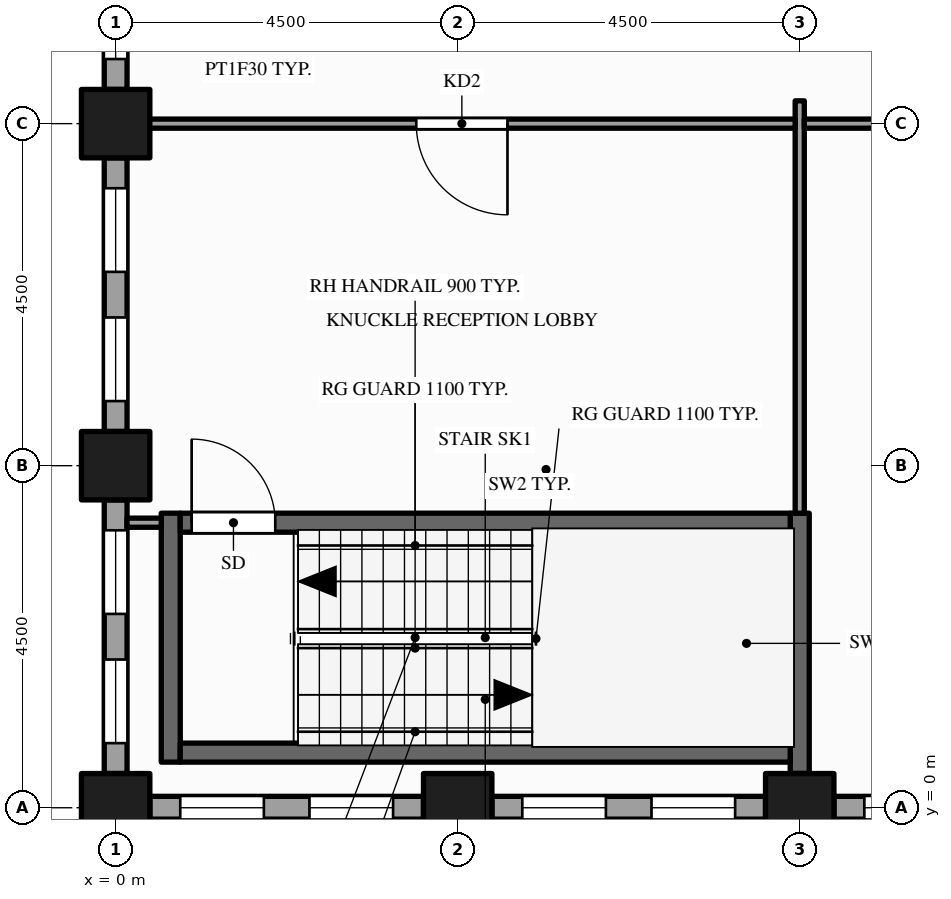
"""IFC4 building model, lengths in metres.
Left out: names, types, materials, properties, quantities, classifications, styles, units other than length and angle.
Written with IfcOpenShell. Run it as: python <this file> out.ifc"""

import sys

from ifc_helpers import new_model, si_unit, direction, frame, frame_2d, origin, origin_2d, place, context, subcontext, project, spatial, rectangle, hollow_rectangle, extrude, element, fill, save


model = new_model("IFC4")
c1 = context("Model", 3, precision=1e-05, world=origin(), true_north=direction((0.0, 1.0)))
c2 = subcontext(c1, "Body", "Model", "MODEL_VIEW")
j1 = project(units=[si_unit("LENGTHUNIT", "METRE"), si_unit("PLANEANGLEUNIT", "RADIAN")], contexts=[c1])
p1 = place(None, origin())
s1 = spatial("IfcSite", under=j1, at=p1, CompositionType="ELEMENT")
p2 = place(p1, origin())
s2 = spatial("IfcBuilding", under=s1, at=p2, CompositionType="ELEMENT")
p3 = place(p2, frame((0.0, 0.0, 139.0)))
s3 = spatial("IfcBuildingStorey", under=s2, at=p3, CompositionType="ELEMENT", Elevation=139.0)
for number, where, z_axis, x_axis in (
    (1, (0.0, 0.0, -0.15), (0.0, 0.0, 1.0), (1.0, 0.0, 0.0)),
    (2, (0.0, 4.5, -0.15), (0.0, 0.0, 1.0), (1.0, 0.0, 0.0)),
    (3, (0.0, 9.0, -0.15), (0.0, 0.0, 1.0), (1.0, 0.0, 0.0)),
    (4, (4.5, 0.0, -0.15), (0.0, 0.0, 1.0), (1.0, 0.0, 0.0)),
    (5, (9.0, 0.0, -0.15), (0.0, 0.0, 1.0), (1.0, 0.0, 0.0)),
):
    element("IfcColumn", number, at=place(p3, frame(where, z_axis=z_axis, x_axis=x_axis)), inside=s3, PredefinedType="COLUMN", context=c2, shape_type="SweptSolid", body=[
        extrude(hollow_rectangle(XDim=0.9, YDim=0.9, WallThickness=0.045, at=origin_2d()), origin(), (0.0, 0.0, 1.0), 4.0),
    ])
p4 = place(p3, frame((0.0, 13.05, 0.0), z_axis=(0.0, 0.0, 1.0), x_axis=(0.0, -1.0, 0.0)))
e6 = element("IfcWall", 6, at=p4, inside=s3, PredefinedType="STANDARD", context=c2, shape_type="SweptSolid", body=[
    extrude(rectangle(XDim=3.6, YDim=0.3, at=frame_2d((1.8, 0.0))), origin(), (0.0, 0.0, 1.0), 3.149),
])
p5 = place(p4, frame((0.4, 0.0, 0.9)))
e7 = element("IfcOpeningElement", 7, at=p5, cuts=e6, PredefinedType="OPENING", context=c2, shape_type="SweptSolid", body=[
    extrude(rectangle(XDim=1.1, YDim=2.0, at=frame_2d((0.55, 1.0))), frame((0.0, 0.16, 0.0), z_axis=(0.0, -1.0, 0.0), x_axis=(1.0, 0.0, 0.0)), (0.0, 0.0, 1.0), 0.32),
])
p6 = place(p4, frame((2.1, 0.0, 0.9)))
e8 = element("IfcOpeningElement", 8, at=p6, cuts=e6, PredefinedType="OPENING", context=c2, shape_type="SweptSolid", body=[
    extrude(rectangle(XDim=1.1, YDim=2.0, at=frame_2d((0.55, 1.0))), frame((0.0, 0.16, 0.0), z_axis=(0.0, -1.0, 0.0), x_axis=(1.0, 0.0, 0.0)), (0.0, 0.0, 1.0), 0.32),
])
p7 = place(p3, frame((0.0, 8.55, 0.0), z_axis=(0.0, 0.0, 1.0), x_axis=(0.0, -1.0, 0.0)))
e9 = element("IfcWall", 9, at=p7, inside=s3, PredefinedType="STANDARD", context=c2, shape_type="SweptSolid", body=[
    extrude(rectangle(XDim=3.6, YDim=0.3, at=frame_2d((1.8, 0.0))), origin(), (0.0, 0.0, 1.0), 3.149),
])
p8 = place(p7, frame((0.4, 0.0, 0.9)))
e10 = element("IfcOpeningElement", 10, at=p8, cuts=e9, PredefinedType="OPENING", context=c2, shape_type="SweptSolid", body=[
    extrude(rectangle(XDim=1.1, YDim=2.0, at=frame_2d((0.55, 1.0))), frame((0.0, 0.16, 0.0), z_axis=(0.0, -1.0, 0.0), x_axis=(1.0, 0.0, 0.0)), (0.0, 0.0, 1.0), 0.32),
])
p9 = place(p7, frame((2.1, 0.0, 0.9)))
e11 = element("IfcOpeningElement", 11, at=p9, cuts=e9, PredefinedType="OPENING", context=c2, shape_type="SweptSolid", body=[
    extrude(rectangle(XDim=1.1, YDim=2.0, at=frame_2d((0.55, 1.0))), frame((0.0, 0.16, 0.0), z_axis=(0.0, -1.0, 0.0), x_axis=(1.0, 0.0, 0.0)), (0.0, 0.0, 1.0), 0.32),
])
p10 = place(p3, frame((0.0, 4.05, 0.0), z_axis=(0.0, 0.0, 1.0), x_axis=(0.0, -1.0, 0.0)))
e12 = element("IfcWall", 12, at=p10, inside=s3, PredefinedType="STANDARD", context=c2, shape_type="SweptSolid", body=[
    extrude(rectangle(XDim=3.6, YDim=0.3, at=frame_2d((1.8, 0.0))), origin(), (0.0, 0.0, 1.0), 3.149),
])
p11 = place(p10, frame((0.4, 0.0, 0.9)))
e13 = element("IfcOpeningElement", 13, at=p11, cuts=e12, PredefinedType="OPENING", context=c2, shape_type="SweptSolid", body=[
    extrude(rectangle(XDim=1.1, YDim=2.0, at=frame_2d((0.55, 1.0))), frame((0.0, 0.16, 0.0), z_axis=(0.0, -1.0, 0.0), x_axis=(1.0, 0.0, 0.0)), (0.0, 0.0, 1.0), 0.32),
])
p12 = place(p10, frame((2.1, 0.0, 0.9)))
e14 = element("IfcOpeningElement", 14, at=p12, cuts=e12, PredefinedType="OPENING", context=c2, shape_type="SweptSolid", body=[
    extrude(rectangle(XDim=1.1, YDim=2.0, at=frame_2d((0.55, 1.0))), frame((0.0, 0.16, 0.0), z_axis=(0.0, -1.0, 0.0), x_axis=(1.0, 0.0, 0.0)), (0.0, 0.0, 1.0), 0.32),
])
p13 = place(p3, frame((0.45, 0.0, 0.0), z_axis=(0.0, 0.0, 1.0), x_axis=(1.0, 0.0, 0.0)))
e15 = element("IfcWall", 15, at=p13, inside=s3, PredefinedType="STANDARD", context=c2, shape_type="SweptSolid", body=[
    extrude(rectangle(XDim=3.6, YDim=0.3, at=frame_2d((1.8, 0.0))), origin(), (0.0, 0.0, 1.0), 3.149),
])
p14 = place(p13, frame((0.4, 0.0, 0.9)))
e16 = element("IfcOpeningElement", 16, at=p14, cuts=e15, PredefinedType="OPENING", context=c2, shape_type="SweptSolid", body=[
    extrude(rectangle(XDim=1.1, YDim=2.0, at=frame_2d((0.55, 1.0))), frame((0.0, 0.16, 0.0), z_axis=(0.0, -1.0, 0.0), x_axis=(1.0, 0.0, 0.0)), (0.0, 0.0, 1.0), 0.32),
])
p15 = place(p13, frame((2.1, 0.0, 0.9)))
e17 = element("IfcOpeningElement", 17, at=p15, cuts=e15, PredefinedType="OPENING", context=c2, shape_type="SweptSolid", body=[
    extrude(rectangle(XDim=1.1, YDim=2.0, at=frame_2d((0.55, 1.0))), frame((0.0, 0.16, 0.0), z_axis=(0.0, -1.0, 0.0), x_axis=(1.0, 0.0, 0.0)), (0.0, 0.0, 1.0), 0.32),
])
p16 = place(p3, frame((4.95, 0.0, 0.0), z_axis=(0.0, 0.0, 1.0), x_axis=(1.0, 0.0, 0.0)))
e18 = element("IfcWall", 18, at=p16, inside=s3, PredefinedType="STANDARD", context=c2, shape_type="SweptSolid", body=[
    extrude(rectangle(XDim=3.6, YDim=0.3, at=frame_2d((1.8, 0.0))), origin(), (0.0, 0.0, 1.0), 3.149),
])
p17 = place(p16, frame((0.4, 0.0, 0.9)))
e19 = element("IfcOpeningElement", 19, at=p17, cuts=e18, PredefinedType="OPENING", context=c2, shape_type="SweptSolid", body=[
    extrude(rectangle(XDim=1.1, YDim=2.0, at=frame_2d((0.55, 1.0))), frame((0.0, 0.16, 0.0), z_axis=(0.0, -1.0, 0.0), x_axis=(1.0, 0.0, 0.0)), (0.0, 0.0, 1.0), 0.32),
])
p18 = place(p16, frame((2.1, 0.0, 0.9)))
e20 = element("IfcOpeningElement", 20, at=p18, cuts=e18, PredefinedType="OPENING", context=c2, shape_type="SweptSolid", body=[
    extrude(rectangle(XDim=1.1, YDim=2.0, at=frame_2d((0.55, 1.0))), frame((0.0, 0.16, 0.0), z_axis=(0.0, -1.0, 0.0), x_axis=(1.0, 0.0, 0.0)), (0.0, 0.0, 1.0), 0.32),
])
p19 = place(p3, frame((9.45, 0.0, 0.0), z_axis=(0.0, 0.0, 1.0), x_axis=(1.0, 0.0, 0.0)))
e21 = element("IfcWall", 21, at=p19, inside=s3, PredefinedType="STANDARD", context=c2, shape_type="SweptSolid", body=[
    extrude(rectangle(XDim=3.6, YDim=0.3, at=frame_2d((1.8, 0.0))), origin(), (0.0, 0.0, 1.0), 2.87),
])
p20 = place(p19, frame((0.4, 0.0, 0.9)))
e22 = element("IfcOpeningElement", 22, at=p20, cuts=e21, PredefinedType="OPENING", context=c2, shape_type="SweptSolid", body=[
    extrude(rectangle(XDim=1.1, YDim=1.75, at=frame_2d((0.55, 0.875))), frame((0.0, 0.16, 0.0), z_axis=(0.0, -1.0, 0.0), x_axis=(1.0, 0.0, 0.0)), (0.0, 0.0, 1.0), 0.32),
])
p21 = place(p19, frame((2.1, 0.0, 0.9)))
e23 = element("IfcOpeningElement", 23, at=p21, cuts=e21, PredefinedType="OPENING", context=c2, shape_type="SweptSolid", body=[
    extrude(rectangle(XDim=1.1, YDim=1.75, at=frame_2d((0.55, 0.875))), frame((0.0, 0.16, 0.0), z_axis=(0.0, -1.0, 0.0), x_axis=(1.0, 0.0, 0.0)), (0.0, 0.0, 1.0), 0.32),
])
p22 = place(p3, frame((0.725, 0.6, 0.0), z_axis=(0.0, 0.0, 1.0), x_axis=(0.0, 1.0, 0.0)))
e24 = element("IfcWall", 24, at=p22, inside=s3, PredefinedType="SHEAR", context=c2, shape_type="SweptSolid", body=[
    extrude(rectangle(XDim=3.275, YDim=0.25, at=frame_2d((1.637, 0.0))), origin(), (0.0, 0.0, 1.0), 3.85),
])
p23 = place(p3, frame((9.0, 0.15, 0.0), z_axis=(0.0, 0.0, 1.0), x_axis=(0.0, 1.0, 0.0)))
e25 = element("IfcWall", 25, at=p23, inside=s3, PredefinedType="PARTITIONING", context=c2, shape_type="SweptSolid", body=[
    extrude(rectangle(XDim=0.3, YDim=0.12, at=frame_2d((0.15, 0.0))), origin(), (0.0, 0.0, 1.0), 3.85),
])
p24 = place(p3, frame((9.0, 0.45, 0.0), z_axis=(0.0, 0.0, 1.0), x_axis=(0.0, 1.0, 0.0)))
e26 = element("IfcWall", 26, at=p24, inside=s3, PredefinedType="SHEAR", context=c2, shape_type="SweptSolid", body=[
    extrude(rectangle(XDim=3.425, YDim=0.25, at=frame_2d((1.712, 0.0))), origin(), (0.0, 0.0, 1.0), 3.85),
])
p25 = place(p3, frame((9.0, 3.875, 0.0), z_axis=(0.0, 0.0, 1.0), x_axis=(0.0, 1.0, 0.0)))
e27 = element("IfcWall", 27, at=p25, inside=s3, PredefinedType="PARTITIONING", context=c2, shape_type="SweptSolid", body=[
    extrude(rectangle(XDim=5.425, YDim=0.12, at=frame_2d((2.712, 0.0))), origin(), (0.0, 0.0, 1.0), 2.87),
])
p26 = place(p3, frame((0.85, 0.725, 0.0), z_axis=(0.0, 0.0, 1.0), x_axis=(1.0, 0.0, 0.0)))
e28 = element("IfcWall", 28, at=p26, inside=s3, PredefinedType="SHEAR", context=c2, shape_type="SweptSolid", body=[
    extrude(rectangle(XDim=8.025, YDim=0.25, at=frame_2d((4.012, 0.0))), origin(), (0.0, 0.0, 1.0), 3.85),
])
p27 = place(p3, frame((0.15, 3.75, 0.0), z_axis=(0.0, 0.0, 1.0), x_axis=(1.0, 0.0, 0.0)))
e29 = element("IfcWall", 29, at=p27, inside=s3, PredefinedType="PARTITIONING", context=c2, shape_type="SweptSolid", body=[
    extrude(rectangle(XDim=0.45, YDim=0.12, at=frame_2d((0.225, 0.0))), origin(), (0.0, 0.0, 1.0), 3.85),
])
p28 = place(p3, frame((0.85, 3.75, 0.0), z_axis=(0.0, 0.0, 1.0), x_axis=(1.0, 0.0, 0.0)))
e30 = element("IfcWall", 30, at=p28, inside=s3, PredefinedType="SHEAR", context=c2, shape_type="SweptSolid", body=[
    extrude(rectangle(XDim=8.025, YDim=0.25, at=frame_2d((4.012, 0.0))), origin(), (0.0, 0.0, 1.0), 3.85),
])
p29 = place(p28, frame((0.15, 0.0, 0.0)))
e31 = element("IfcOpeningElement", 31, at=p29, cuts=e30, PredefinedType="OPENING", context=c2, shape_type="SweptSolid", body=[
    extrude(rectangle(XDim=1.1, YDim=2.1, at=frame_2d((0.55, 1.05))), frame((0.0, 0.135, 0.0), z_axis=(0.0, -1.0, 0.0), x_axis=(1.0, 0.0, 0.0)), (0.0, 0.0, 1.0), 0.27),
])
p30 = place(p3, frame((0.15, 9.0, 0.0), z_axis=(0.0, 0.0, 1.0), x_axis=(1.0, 0.0, 0.0)))
e32 = element("IfcWall", 32, at=p30, inside=s3, PredefinedType="PARTITIONING", context=c2, shape_type="SweptSolid", body=[
    extrude(rectangle(XDim=8.79, YDim=0.12, at=frame_2d((4.395, 0.0))), origin(), (0.0, 0.0, 1.0), 2.87),
])
p31 = place(p30, frame((3.805, 0.0, 0.0)))
e33 = element("IfcOpeningElement", 33, at=p31, cuts=e32, PredefinedType="OPENING", context=c2, shape_type="SweptSolid", body=[
    extrude(rectangle(XDim=1.2, YDim=2.1, at=frame_2d((0.6, 1.05))), frame((0.0, 0.07, 0.0), z_axis=(0.0, -1.0, 0.0), x_axis=(1.0, 0.0, 0.0)), (0.0, 0.0, 1.0), 0.14),
])
p32 = place(p3, frame((9.06, 9.0, 0.0), z_axis=(0.0, 0.0, 1.0), x_axis=(1.0, 0.0, 0.0)))
e34 = element("IfcWall", 34, at=p32, inside=s3, PredefinedType="PARTITIONING", context=c2, shape_type="SweptSolid", body=[
    extrude(rectangle(XDim=4.38, YDim=0.12, at=frame_2d((2.19, 0.0))), origin(), (0.0, 0.0, 1.0), 2.87),
])
p33 = place(p32, frame((1.69, 0.0, 0.0)))
e35 = element("IfcOpeningElement", 35, at=p33, cuts=e34, PredefinedType="OPENING", context=c2, shape_type="SweptSolid", body=[
    extrude(rectangle(XDim=1.0, YDim=2.1, at=frame_2d((0.5, 1.05))), frame((0.0, 0.07, 0.0), z_axis=(0.0, -1.0, 0.0), x_axis=(1.0, 0.0, 0.0)), (0.0, 0.0, 1.0), 0.14),
])
p34 = place(p6, origin())
e36 = element("IfcWindow", 36, at=p34, inside=s3, PartitioningType="SINGLE_PANEL", PredefinedType="WINDOW", context=c2, shape_type="SweptSolid", body=[
    extrude(rectangle(XDim=1.1, YDim=2.0, at=frame_2d((0.55, 1.0))), frame((0.0, 0.03, 0.0), z_axis=(0.0, -1.0, 0.0), x_axis=(1.0, 0.0, 0.0)), (0.0, 0.0, 1.0), 0.06),
])
fill(e8, e36)
p35 = place(p8, origin())
e37 = element("IfcWindow", 37, at=p35, inside=s3, PartitioningType="SINGLE_PANEL", PredefinedType="WINDOW", context=c2, shape_type="SweptSolid", body=[
    extrude(rectangle(XDim=1.1, YDim=2.0, at=frame_2d((0.55, 1.0))), frame((0.0, 0.03, 0.0), z_axis=(0.0, -1.0, 0.0), x_axis=(1.0, 0.0, 0.0)), (0.0, 0.0, 1.0), 0.06),
])
fill(e10, e37)
p36 = place(p9, origin())
e38 = element("IfcWindow", 38, at=p36, inside=s3, PartitioningType="SINGLE_PANEL", PredefinedType="WINDOW", context=c2, shape_type="SweptSolid", body=[
    extrude(rectangle(XDim=1.1, YDim=2.0, at=frame_2d((0.55, 1.0))), frame((0.0, 0.03, 0.0), z_axis=(0.0, -1.0, 0.0), x_axis=(1.0, 0.0, 0.0)), (0.0, 0.0, 1.0), 0.06),
])
fill(e11, e38)
p37 = place(p11, origin())
e39 = element("IfcWindow", 39, at=p37, inside=s3, PartitioningType="SINGLE_PANEL", PredefinedType="WINDOW", context=c2, shape_type="SweptSolid", body=[
    extrude(rectangle(XDim=1.1, YDim=2.0, at=frame_2d((0.55, 1.0))), frame((0.0, 0.03, 0.0), z_axis=(0.0, -1.0, 0.0), x_axis=(1.0, 0.0, 0.0)), (0.0, 0.0, 1.0), 0.06),
])
fill(e13, e39)
p38 = place(p12, origin())
e40 = element("IfcWindow", 40, at=p38, inside=s3, PartitioningType="SINGLE_PANEL", PredefinedType="WINDOW", context=c2, shape_type="SweptSolid", body=[
    extrude(rectangle(XDim=1.1, YDim=2.0, at=frame_2d((0.55, 1.0))), frame((0.0, 0.03, 0.0), z_axis=(0.0, -1.0, 0.0), x_axis=(1.0, 0.0, 0.0)), (0.0, 0.0, 1.0), 0.06),
])
fill(e14, e40)
p39 = place(p14, origin())
e41 = element("IfcWindow", 41, at=p39, inside=s3, PartitioningType="SINGLE_PANEL", PredefinedType="WINDOW", context=c2, shape_type="SweptSolid", body=[
    extrude(rectangle(XDim=1.1, YDim=2.0, at=frame_2d((0.55, 1.0))), frame((0.0, 0.03, 0.0), z_axis=(0.0, -1.0, 0.0), x_axis=(1.0, 0.0, 0.0)), (0.0, 0.0, 1.0), 0.06),
])
fill(e16, e41)
p40 = place(p15, origin())
e42 = element("IfcWindow", 42, at=p40, inside=s3, PartitioningType="SINGLE_PANEL", PredefinedType="WINDOW", context=c2, shape_type="SweptSolid", body=[
    extrude(rectangle(XDim=1.1, YDim=2.0, at=frame_2d((0.55, 1.0))), frame((0.0, 0.03, 0.0), z_axis=(0.0, -1.0, 0.0), x_axis=(1.0, 0.0, 0.0)), (0.0, 0.0, 1.0), 0.06),
])
fill(e17, e42)
p41 = place(p17, origin())
e43 = element("IfcWindow", 43, at=p41, inside=s3, PartitioningType="SINGLE_PANEL", PredefinedType="WINDOW", context=c2, shape_type="SweptSolid", body=[
    extrude(rectangle(XDim=1.1, YDim=2.0, at=frame_2d((0.55, 1.0))), frame((0.0, 0.03, 0.0), z_axis=(0.0, -1.0, 0.0), x_axis=(1.0, 0.0, 0.0)), (0.0, 0.0, 1.0), 0.06),
])
fill(e19, e43)
p42 = place(p18, origin())
e44 = element("IfcWindow", 44, at=p42, inside=s3, PartitioningType="SINGLE_PANEL", PredefinedType="WINDOW", context=c2, shape_type="SweptSolid", body=[
    extrude(rectangle(XDim=1.1, YDim=2.0, at=frame_2d((0.55, 1.0))), frame((0.0, 0.03, 0.0), z_axis=(0.0, -1.0, 0.0), x_axis=(1.0, 0.0, 0.0)), (0.0, 0.0, 1.0), 0.06),
])
fill(e20, e44)
p43 = place(p20, origin())
e45 = element("IfcWindow", 45, at=p43, inside=s3, PartitioningType="SINGLE_PANEL", PredefinedType="WINDOW", context=c2, shape_type="SweptSolid", body=[
    extrude(rectangle(XDim=1.1, YDim=1.75, at=frame_2d((0.55, 0.875))), frame((0.0, 0.03, 0.0), z_axis=(0.0, -1.0, 0.0), x_axis=(1.0, 0.0, 0.0)), (0.0, 0.0, 1.0), 0.06),
])
fill(e22, e45)
p44 = place(p29, origin())
e46 = element("IfcDoor", 46, at=p44, inside=s3, OperationType="SINGLE_SWING_LEFT", PredefinedType="DOOR", context=c2, shape_type="SweptSolid", body=[
    extrude(rectangle(XDim=1.1, YDim=2.1, at=frame_2d((0.55, 1.05))), frame((0.0, 0.025, 0.0), z_axis=(0.0, -1.0, 0.0), x_axis=(1.0, 0.0, 0.0)), (0.0, 0.0, 1.0), 0.05),
])
fill(e31, e46)
p45 = place(p31, origin())
e47 = element("IfcDoor", 47, at=p45, inside=s3, OperationType="SINGLE_SWING_RIGHT", PredefinedType="DOOR", context=c2, shape_type="SweptSolid", body=[
    extrude(rectangle(XDim=1.2, YDim=2.1, at=frame_2d((0.6, 1.05))), frame((0.0, 0.025, 0.0), z_axis=(0.0, -1.0, 0.0), x_axis=(1.0, 0.0, 0.0)), (0.0, 0.0, 1.0), 0.05),
])
fill(e33, e47)
save(model, sys.argv[1])
